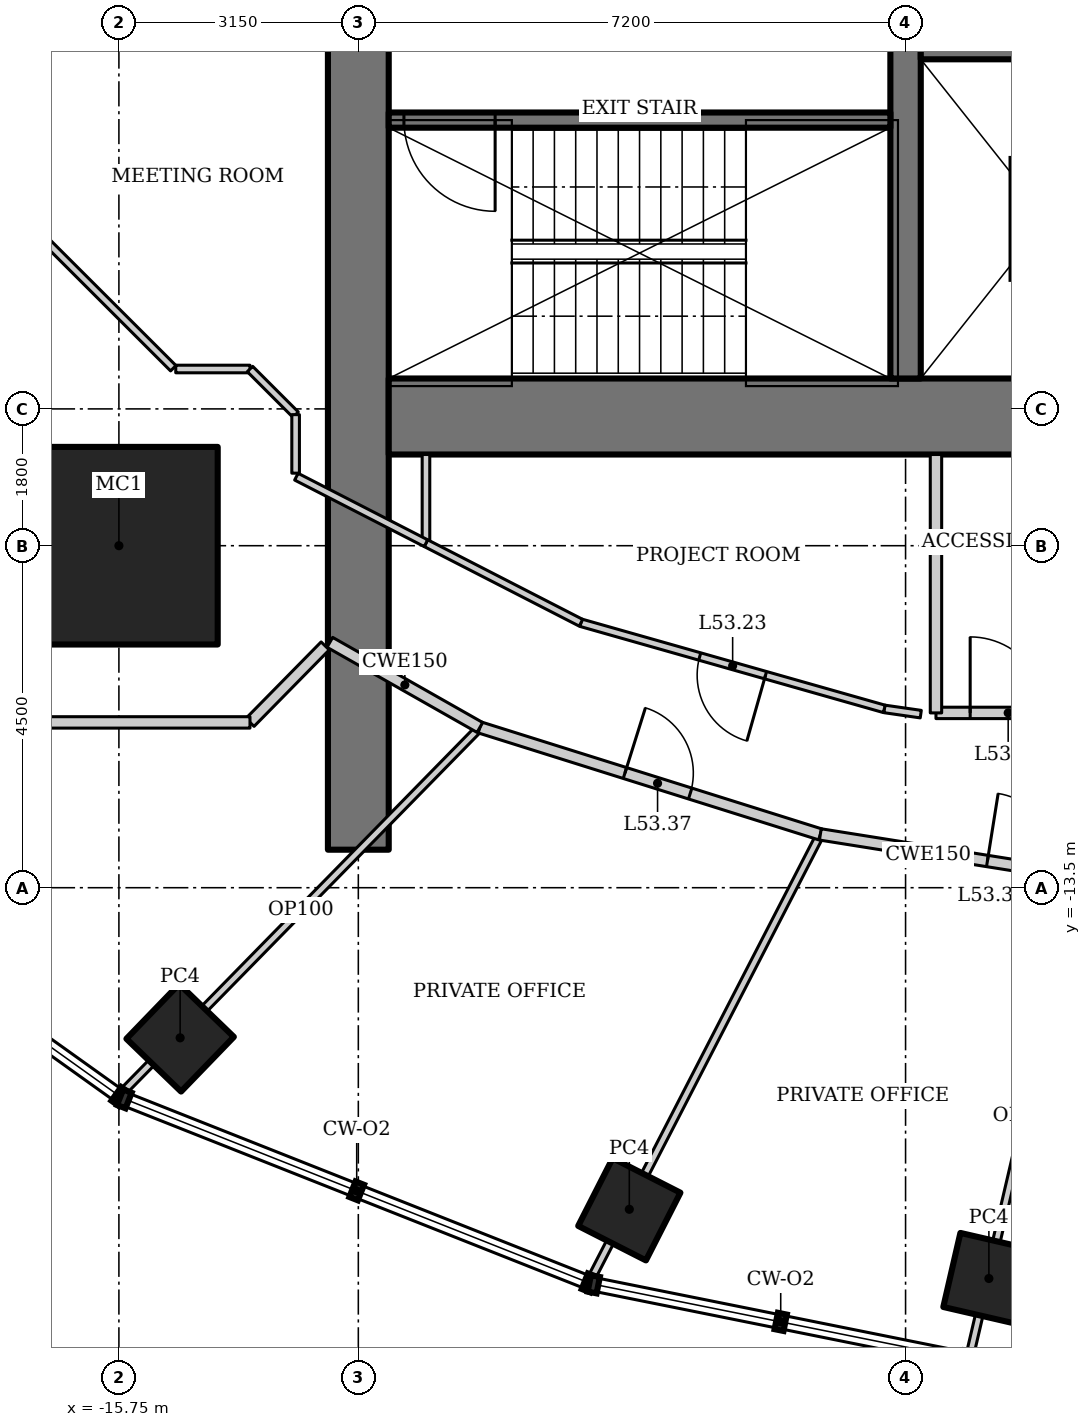
"""IFC4 building model, lengths in metres.
Left out: names, types, materials, properties, quantities, classifications, styles, units other than length and angle.
Written with IfcOpenShell. Run it as: python <this file> out.ifc"""

import sys

from ifc_helpers import new_model, si_unit, direction, frame, frame_2d, origin, origin_2d, place, context, subcontext, project, spatial, rectangle, hollow_rectangle, extrude, element, fill, save


model = new_model("IFC4")
c1 = context("Model", 3, precision=1e-05, world=origin(), true_north=direction((0.0, 1.0)))
c2 = subcontext(c1, "Body", "Model", "MODEL_VIEW")
j1 = project(units=[si_unit("LENGTHUNIT", "METRE"), si_unit("PLANEANGLEUNIT", "RADIAN")], contexts=[c1])
p1 = place(None, origin())
s1 = spatial("IfcSite", under=j1, at=p1, CompositionType="ELEMENT")
p2 = place(p1, origin())
s2 = spatial("IfcBuilding", under=s1, at=p2, CompositionType="ELEMENT")
p3 = place(p2, frame((0.0, 0.0, 228.4)))
s3 = spatial("IfcBuildingStorey", under=s2, at=p3, CompositionType="ELEMENT", Elevation=228.4)
p4 = place(p3, frame((-15.75, -9.0, 0.0), z_axis=(0.0, 0.0, 1.0), x_axis=(1.0, 0.0, 0.0)))
e1 = element("IfcColumn", 1, at=p4, inside=s3, PredefinedType="COLUMN", context=c2, shape_type="SweptSolid", body=[
    extrude(hollow_rectangle(XDim=2.6, YDim=2.6, WallThickness=0.13, at=origin_2d()), origin(), (0.0, 0.0, 1.0), 4.2),
])
for number, where, z_axis, x_axis in (
    (2, (-14.944, -15.475, 0.0), (0.0, 0.0, 1.0), (0.695, 0.719, 0.0)),
    (3, (-9.035, -17.731, 0.0), (0.0, 0.0, 1.0), (0.454, 0.891, 0.0)),
    (4, (-4.304, -18.642, 0.0), (0.0, 0.0, 1.0), (0.225, 0.974, 0.0)),
):
    element("IfcColumn", number, at=place(p3, frame(where, z_axis=z_axis, x_axis=x_axis)), inside=s3, PredefinedType="COLUMN", context=c2, shape_type="SweptSolid", body=[
        extrude(hollow_rectangle(XDim=1.0, YDim=1.0, WallThickness=0.08, at=origin_2d()), origin(), (0.0, 0.0, 1.0), 4.2),
    ])
p5 = place(p3, frame((-12.6, 13.0, 0.0), z_axis=(0.0, 0.0, 1.0), x_axis=(0.0, -1.0, 0.0)))
e5 = element("IfcWall", 5, at=p5, inside=s3, PredefinedType="SHEAR", context=c2, shape_type="SweptSolid", body=[
    extrude(rectangle(XDim=26.0, YDim=0.8, at=frame_2d((13.0, 0.0))), origin(), (0.0, 0.0, 1.0), 4.2),
])
p6 = place(p5, frame((12.1, 0.0, 0.0)))
e6 = element("IfcOpeningElement", 6, at=p6, cuts=e5, PredefinedType="OPENING", context=c2, shape_type="SweptSolid", body=[
    extrude(rectangle(XDim=1.8, YDim=2.1, at=frame_2d((0.9, 1.05))), frame((0.0, 0.41, 0.0), z_axis=(0.0, -1.0, 0.0), x_axis=(1.0, 0.0, 0.0)), (0.0, 0.0, 1.0), 0.82),
])
p7 = place(p3, frame((-12.2, -7.3, 0.0), z_axis=(0.0, 0.0, 1.0), x_axis=(1.0, 0.0, 0.0)))
e7 = element("IfcWall", 7, at=p7, inside=s3, PredefinedType="SHEAR", context=c2, shape_type="SweptSolid", body=[
    extrude(rectangle(XDim=24.4, YDim=1.0, at=frame_2d((12.2, 0.0))), origin(), (0.0, 0.0, 1.0), 4.2),
])
p8 = place(p3, frame((-5.4, 7.8, 0.0), z_axis=(0.0, 0.0, 1.0), x_axis=(0.0, -1.0, 0.0)))
e8 = element("IfcWall", 8, at=p8, inside=s3, PredefinedType="SHEAR", context=c2, shape_type="SweptSolid", body=[
    extrude(rectangle(XDim=14.6, YDim=0.4, at=frame_2d((7.3, 0.0))), origin(), (0.0, 0.0, 1.0), 4.2),
])
p9 = place(p8, frame((6.4, 0.0, 0.0)))
e9 = element("IfcOpeningElement", 9, at=p9, cuts=e8, PredefinedType="OPENING", context=c2, shape_type="SweptSolid", body=[
    extrude(rectangle(XDim=1.8, YDim=2.1, at=frame_2d((0.9, 1.05))), frame((0.0, 0.21, 0.0), z_axis=(0.0, -1.0, 0.0), x_axis=(1.0, 0.0, 0.0)), (0.0, 0.0, 1.0), 0.42),
])
p10 = place(p3, frame((-5.2, -2.4, 0.0), z_axis=(0.0, 0.0, 1.0), x_axis=(1.0, 0.0, 0.0)))
e10 = element("IfcWall", 10, at=p10, inside=s3, PredefinedType="SHEAR", context=c2, shape_type="SweptSolid", body=[
    extrude(rectangle(XDim=10.4, YDim=0.4, at=frame_2d((5.2, 0.0))), origin(), (0.0, 0.0, 1.0), 4.2),
])
p11 = place(p10, frame((1.683, 0.0, 0.0)))
e11 = element("IfcOpeningElement", 11, at=p11, cuts=e10, PredefinedType="OPENING", context=c2, shape_type="SweptSolid", body=[
    extrude(rectangle(XDim=1.1, YDim=2.2, at=frame_2d((0.55, 1.1))), frame((0.0, 0.21, 0.0), z_axis=(0.0, -1.0, 0.0), x_axis=(1.0, 0.0, 0.0)), (0.0, 0.0, 1.0), 0.42),
])
p12 = place(p10, frame((5.217, 0.0, 0.0)))
e12 = element("IfcOpeningElement", 12, at=p12, cuts=e10, PredefinedType="OPENING", context=c2, shape_type="SweptSolid", body=[
    extrude(rectangle(XDim=1.1, YDim=2.2, at=frame_2d((0.55, 1.1))), frame((0.0, 0.21, 0.0), z_axis=(0.0, -1.0, 0.0), x_axis=(1.0, 0.0, 0.0)), (0.0, 0.0, 1.0), 0.42),
])
p13 = place(p10, frame((8.75, 0.0, 0.0)))
e13 = element("IfcOpeningElement", 13, at=p13, cuts=e10, PredefinedType="OPENING", context=c2, shape_type="SweptSolid", body=[
    extrude(rectangle(XDim=1.1, YDim=2.2, at=frame_2d((0.55, 1.1))), frame((0.0, 0.21, 0.0), z_axis=(0.0, -1.0, 0.0), x_axis=(1.0, 0.0, 0.0)), (0.0, 0.0, 1.0), 0.42),
])
p14 = place(p3, frame((-5.6, -3.4, 0.0), z_axis=(0.0, 0.0, 1.0), x_axis=(-1.0, 0.0, 0.0)))
e14 = element("IfcWall", 14, at=p14, inside=s3, PredefinedType="SHEAR", context=c2, shape_type="SweptSolid", body=[
    extrude(rectangle(XDim=6.6, YDim=0.2, at=frame_2d((3.3, 0.0))), origin(), (0.0, 0.0, 1.0), 4.2),
])
p15 = place(p14, frame((5.2, 0.0, 0.0)))
e15 = element("IfcOpeningElement", 15, at=p15, cuts=e14, PredefinedType="OPENING", context=c2, shape_type="SweptSolid", body=[
    extrude(rectangle(XDim=1.2, YDim=2.1, at=frame_2d((0.6, 1.05))), frame((0.0, 0.11, 0.0), z_axis=(0.0, -1.0, 0.0), x_axis=(1.0, 0.0, 0.0)), (0.0, 0.0, 1.0), 0.22),
])
p16 = place(p3, frame((-15.709, -16.199, 0.0), z_axis=(0.0, 0.0, 1.0), x_axis=(0.699758297028, 0.71437967898, 0.0)))
e16 = element("IfcWall", 16, at=p16, inside=s3, PredefinedType="PARTITIONING", context=c2, shape_type="SweptSolid", body=[
    extrude(rectangle(XDim=6.729, YDim=0.1, at=frame_2d((3.365, 0.0))), origin(), (0.0, 0.0, 1.0), 3.41),
])
p17 = place(p3, frame((-9.54, -18.65, 0.0), z_axis=(0.0, 0.0, 1.0), x_axis=(0.458420942987, 0.888735190611, 0.0)))
e17 = element("IfcWall", 17, at=p17, inside=s3, PredefinedType="PARTITIONING", context=c2, shape_type="SweptSolid", body=[
    extrude(rectangle(XDim=6.584, YDim=0.1, at=frame_2d((3.292, 0.0))), origin(), (0.0, 0.0, 1.0), 3.293),
])
p18 = place(p3, frame((-4.556, -19.657, 0.0), z_axis=(0.0, 0.0, 1.0), x_axis=(0.227524978141, 0.973772244584, 0.0)))
e18 = element("IfcWall", 18, at=p18, inside=s3, PredefinedType="PARTITIONING", context=c2, shape_type="SweptSolid", body=[
    extrude(rectangle(XDim=6.48, YDim=0.1, at=frame_2d((3.24, 0.0))), origin(), (0.0, 0.0, 1.0), 3.293),
])
p19 = place(p3, frame((-11.001, -11.392, 0.0), z_axis=(0.0, 0.0, 1.0), x_axis=(0.954031103669, -0.299707612903, 0.0)))
e19 = element("IfcWall", 19, at=p19, inside=s3, PredefinedType="PARTITIONING", context=c2, shape_type="SweptSolid", body=[
    extrude(rectangle(XDim=4.695, YDim=0.15, at=frame_2d((2.348, 0.0))), origin(), (0.0, 0.0, 1.0), 4.05),
])
p20 = place(p19, frame((2.0, 0.0, 0.0)))
e20 = element("IfcOpeningElement", 20, at=p20, cuts=e19, PredefinedType="OPENING", context=c2, shape_type="SweptSolid", body=[
    extrude(rectangle(XDim=0.9, YDim=2.1, at=frame_2d((0.45, 1.05))), frame((0.0, 0.085, 0.0), z_axis=(0.0, -1.0, 0.0), x_axis=(1.0, 0.0, 0.0)), (0.0, 0.0, 1.0), 0.17),
])
p21 = place(p3, frame((-6.521, -12.799, 0.0), z_axis=(0.0, 0.0, 1.0), x_axis=(0.987554093087, -0.157279729233, 0.0)))
e21 = element("IfcWall", 21, at=p21, inside=s3, PredefinedType="PARTITIONING", context=c2, shape_type="SweptSolid", body=[
    extrude(rectangle(XDim=3.483, YDim=0.15, at=frame_2d((1.742, 0.0))), origin(), (0.0, 0.0, 1.0), 4.05),
])
p22 = place(p21, frame((2.226, 0.0, 0.0)))
e22 = element("IfcOpeningElement", 22, at=p22, cuts=e21, PredefinedType="OPENING", context=c2, shape_type="SweptSolid", body=[
    extrude(rectangle(XDim=0.9, YDim=2.1, at=frame_2d((0.45, 1.05))), frame((0.0, 0.085, 0.0), z_axis=(0.0, -1.0, 0.0), x_axis=(1.0, 0.0, 0.0)), (0.0, 0.0, 1.0), 0.17),
])
p23 = place(p3, frame((-5.0, -11.2, 0.0), z_axis=(0.0, 0.0, 1.0), x_axis=(1.0, 0.0, 0.0)))
e23 = element("IfcWall", 23, at=p23, inside=s3, PredefinedType="SOLIDWALL", context=c2, shape_type="SweptSolid", body=[
    extrude(rectangle(XDim=10.0, YDim=0.15, at=frame_2d((5.0, 0.0))), origin(), (0.0, 0.0, 1.0), 4.05),
])
p24 = place(p23, frame((0.45, 0.0, 0.0)))
e24 = element("IfcOpeningElement", 24, at=p24, cuts=e23, PredefinedType="OPENING", context=c2, shape_type="SweptSolid", body=[
    extrude(rectangle(XDim=1.0, YDim=2.1, at=frame_2d((0.5, 1.05))), frame((0.0, 0.085, 0.0), z_axis=(0.0, -1.0, 0.0), x_axis=(1.0, 0.0, 0.0)), (0.0, 0.0, 1.0), 0.17),
])
p25 = place(p23, frame((3.15, 0.0, 0.0)))
e25 = element("IfcOpeningElement", 25, at=p25, cuts=e23, PredefinedType="OPENING", context=c2, shape_type="SweptSolid", body=[
    extrude(rectangle(XDim=0.9, YDim=2.1, at=frame_2d((0.45, 1.05))), frame((0.0, 0.085, 0.0), z_axis=(0.0, -1.0, 0.0), x_axis=(1.0, 0.0, 0.0)), (0.0, 0.0, 1.0), 0.17),
])
p26 = place(p23, frame((6.55, 0.0, 0.0)))
e26 = element("IfcOpeningElement", 26, at=p26, cuts=e23, PredefinedType="OPENING", context=c2, shape_type="SweptSolid", body=[
    extrude(rectangle(XDim=0.9, YDim=2.1, at=frame_2d((0.45, 1.05))), frame((0.0, 0.085, 0.0), z_axis=(0.0, -1.0, 0.0), x_axis=(1.0, 0.0, 0.0)), (0.0, 0.0, 1.0), 0.17),
])
p27 = place(p23, frame((8.95, 0.0, 0.0)))
e27 = element("IfcOpeningElement", 27, at=p27, cuts=e23, PredefinedType="OPENING", context=c2, shape_type="SweptSolid", body=[
    extrude(rectangle(XDim=0.8, YDim=2.1, at=frame_2d((0.4, 1.05))), frame((0.0, 0.085, 0.0), z_axis=(0.0, -1.0, 0.0), x_axis=(1.0, 0.0, 0.0)), (0.0, 0.0, 1.0), 0.17),
])
p28 = place(p3, frame((-5.0, -7.8, 0.0), z_axis=(0.0, 0.0, 1.0), x_axis=(0.0, -1.0, 0.0)))
e28 = element("IfcWall", 28, at=p28, inside=s3, PredefinedType="SOLIDWALL", context=c2, shape_type="SweptSolid", body=[
    extrude(rectangle(XDim=3.4, YDim=0.15, at=frame_2d((1.7, 0.0))), origin(), (0.0, 0.0, 1.0), 4.05),
])
p29 = place(p3, frame((-11.71, -7.8, 0.0), z_axis=(0.0, 0.0, 1.0), x_axis=(0.0, -1.0, 0.0)))
e29 = element("IfcWall", 29, at=p29, inside=s3, PredefinedType="PARTITIONING", context=c2, shape_type="SweptSolid", body=[
    extrude(rectangle(XDim=1.167, YDim=0.1, at=frame_2d((0.583, 0.0))), origin(), (0.0, 0.0, 1.0), 4.05),
])
p30 = place(p3, frame((-5.2, -11.216, 0.0), z_axis=(0.0, 0.0, 1.0), x_axis=(-0.989797891768, 0.142478536811, 0.0)))
e30 = element("IfcWall", 30, at=p30, inside=s3, PredefinedType="PARTITIONING", context=c2, shape_type="SweptSolid", body=[
    extrude(rectangle(XDim=0.485, YDim=0.1, at=frame_2d((0.242, 0.0))), origin(), (0.0, 0.0, 1.0), 4.05),
])
p31 = place(p3, frame((-5.68, -11.147, 0.0), z_axis=(0.0, 0.0, 1.0), x_axis=(-0.961973498971, 0.273142796496, 0.0)))
e31 = element("IfcWall", 31, at=p31, inside=s3, PredefinedType="PARTITIONING", context=c2, shape_type="SweptSolid", body=[
    extrude(rectangle(XDim=4.148, YDim=0.1, at=frame_2d((2.074, 0.0))), origin(), (0.0, 0.0, 1.0), 4.05),
])
p32 = place(p31, frame((1.624, 0.0, 0.0)))
e32 = element("IfcOpeningElement", 32, at=p32, cuts=e31, PredefinedType="OPENING", context=c2, shape_type="SweptSolid", body=[
    extrude(rectangle(XDim=0.9, YDim=2.1, at=frame_2d((0.45, 1.05))), frame((0.0, 0.06, 0.0), z_axis=(0.0, -1.0, 0.0), x_axis=(1.0, 0.0, 0.0)), (0.0, 0.0, 1.0), 0.12),
])
p33 = place(p3, frame((-9.67, -10.014, 0.0), z_axis=(0.0, 0.0, 1.0), x_axis=(-0.889605609385, 0.456729525814, 0.0)))
e33 = element("IfcWall", 33, at=p33, inside=s3, PredefinedType="PARTITIONING", context=c2, shape_type="SweptSolid", body=[
    extrude(rectangle(XDim=2.293, YDim=0.1, at=frame_2d((1.146, 0.0))), origin(), (0.0, 0.0, 1.0), 4.05),
])
p34 = place(p3, frame((-12.975, -10.271, 0.0), z_axis=(0.0, 0.0, 1.0), x_axis=(0.869722107117, -0.493541747366, 0.0)))
e34 = element("IfcWall", 34, at=p34, inside=s3, PredefinedType="PARTITIONING", context=c2, shape_type="SweptSolid", body=[
    extrude(rectangle(XDim=2.27, YDim=0.15, at=frame_2d((1.135, 0.0))), origin(), (0.0, 0.0, 1.0), 4.05),
])
p35 = place(p3, frame((-11.71, -8.967, 0.0), z_axis=(0.0, 0.0, 1.0), x_axis=(-0.889638356137, 0.456665736935, 0.0)))
e35 = element("IfcWall", 35, at=p35, inside=s3, PredefinedType="PARTITIONING", context=c2, shape_type="SweptSolid", body=[
    extrude(rectangle(XDim=1.917, YDim=0.1, at=frame_2d((0.958, 0.0))), origin(), (0.0, 0.0, 1.0), 4.05),
])
p36 = place(p3, frame((-15.035, -6.665, 0.0), z_axis=(0.0, 0.0, 1.0), x_axis=(-0.707587114823, 0.70662612104, 0.0)))
e36 = element("IfcWall", 36, at=p36, inside=s3, PredefinedType="PARTITIONING", context=c2, shape_type="SweptSolid", body=[
    extrude(rectangle(XDim=3.303, YDim=0.1, at=frame_2d((1.651, 0.0))), origin(), (0.0, 0.0, 1.0), 4.05),
])
p37 = place(p3, frame((-15.002, -6.675, 0.0), z_axis=(0.0, 0.0, 1.0), x_axis=(1.0, 0.0, 0.0)))
e37 = element("IfcWall", 37, at=p37, inside=s3, PredefinedType="PARTITIONING", context=c2, shape_type="SweptSolid", body=[
    extrude(rectangle(XDim=0.977, YDim=0.1, at=frame_2d((0.488, 0.0))), origin(), (0.0, 0.0, 1.0), 4.05),
])
p38 = place(p3, frame((-14.025, -6.675, 0.0), z_axis=(0.0, 0.0, 1.0), x_axis=(0.707106781187, -0.707106781187, 0.0)))
e38 = element("IfcWall", 38, at=p38, inside=s3, PredefinedType="PARTITIONING", context=c2, shape_type="SweptSolid", body=[
    extrude(rectangle(XDim=0.849, YDim=0.1, at=frame_2d((0.425, 0.0))), origin(), (0.0, 0.0, 1.0), 4.05),
])
p39 = place(p3, frame((-13.425, -7.275, 0.0), z_axis=(0.0, 0.0, 1.0), x_axis=(0.0, -1.0, 0.0)))
e39 = element("IfcWall", 39, at=p39, inside=s3, PredefinedType="PARTITIONING", context=c2, shape_type="SweptSolid", body=[
    extrude(rectangle(XDim=0.77, YDim=0.1, at=frame_2d((0.385, 0.0))), origin(), (0.0, 0.0, 1.0), 4.05),
])
p40 = place(p3, frame((-13.036, -10.319, 0.0), z_axis=(0.0, 0.0, 1.0), x_axis=(-0.701113567316, -0.713049623606, 0.0)))
e40 = element("IfcWall", 40, at=p40, inside=s3, PredefinedType="PARTITIONING", context=c2, shape_type="SweptSolid", body=[
    extrude(rectangle(XDim=1.411, YDim=0.15, at=frame_2d((0.706, 0.0))), origin(), (0.0, 0.0, 1.0), 4.05),
])
p41 = place(p3, frame((-14.025, -11.325, 0.0), z_axis=(0.0, 0.0, 1.0), x_axis=(-1.0, 0.0, 0.0)))
e41 = element("IfcWall", 41, at=p41, inside=s3, PredefinedType="PARTITIONING", context=c2, shape_type="SweptSolid", body=[
    extrude(rectangle(XDim=3.449, YDim=0.15, at=frame_2d((1.725, 0.0))), origin(), (0.0, 0.0, 1.0), 4.05),
])
p42 = place(p15, origin())
e42 = element("IfcDoor", 42, at=p42, inside=s3, OperationType="SINGLE_SWING_RIGHT", PredefinedType="DOOR", context=c2, shape_type="SweptSolid", body=[
    extrude(rectangle(XDim=1.2, YDim=2.1, at=frame_2d((0.6, 1.05))), frame((0.0, 0.025, 0.0), z_axis=(0.0, -1.0, 0.0), x_axis=(1.0, 0.0, 0.0)), (0.0, 0.0, 1.0), 0.05),
])
fill(e15, e42)
p43 = place(p24, origin())
e43 = element("IfcDoor", 43, at=p43, inside=s3, OperationType="SINGLE_SWING_LEFT", PredefinedType="DOOR", context=c2, shape_type="SweptSolid", body=[
    extrude(rectangle(XDim=1.0, YDim=2.1, at=frame_2d((0.5, 1.05))), frame((0.0, 0.025, 0.0), z_axis=(0.0, -1.0, 0.0), x_axis=(1.0, 0.0, 0.0)), (0.0, 0.0, 1.0), 0.05),
])
fill(e24, e43)
p44 = place(p32, origin())
e44 = element("IfcDoor", 44, at=p44, inside=s3, OperationType="SINGLE_SWING_LEFT", PredefinedType="DOOR", context=c2, shape_type="SweptSolid", body=[
    extrude(rectangle(XDim=0.9, YDim=2.1, at=frame_2d((0.45, 1.05))), frame((0.0, 0.025, 0.0), z_axis=(0.0, -1.0, 0.0), x_axis=(1.0, 0.0, 0.0)), (0.0, 0.0, 1.0), 0.05),
])
fill(e32, e44)
p45 = place(p20, origin())
e45 = element("IfcDoor", 45, at=p45, inside=s3, OperationType="SINGLE_SWING_LEFT", PredefinedType="DOOR", context=c2, shape_type="SweptSolid", body=[
    extrude(rectangle(XDim=0.9, YDim=2.1, at=frame_2d((0.45, 1.05))), frame((0.0, 0.025, 0.0), z_axis=(0.0, -1.0, 0.0), x_axis=(1.0, 0.0, 0.0)), (0.0, 0.0, 1.0), 0.05),
])
fill(e20, e45)
p46 = place(p22, origin())
e46 = element("IfcDoor", 46, at=p46, inside=s3, OperationType="SINGLE_SWING_LEFT", PredefinedType="DOOR", context=c2, shape_type="SweptSolid", body=[
    extrude(rectangle(XDim=0.9, YDim=2.1, at=frame_2d((0.45, 1.05))), frame((0.0, 0.025, 0.0), z_axis=(0.0, -1.0, 0.0), x_axis=(1.0, 0.0, 0.0)), (0.0, 0.0, 1.0), 0.05),
])
fill(e22, e46)
save(model, sys.argv[1])
